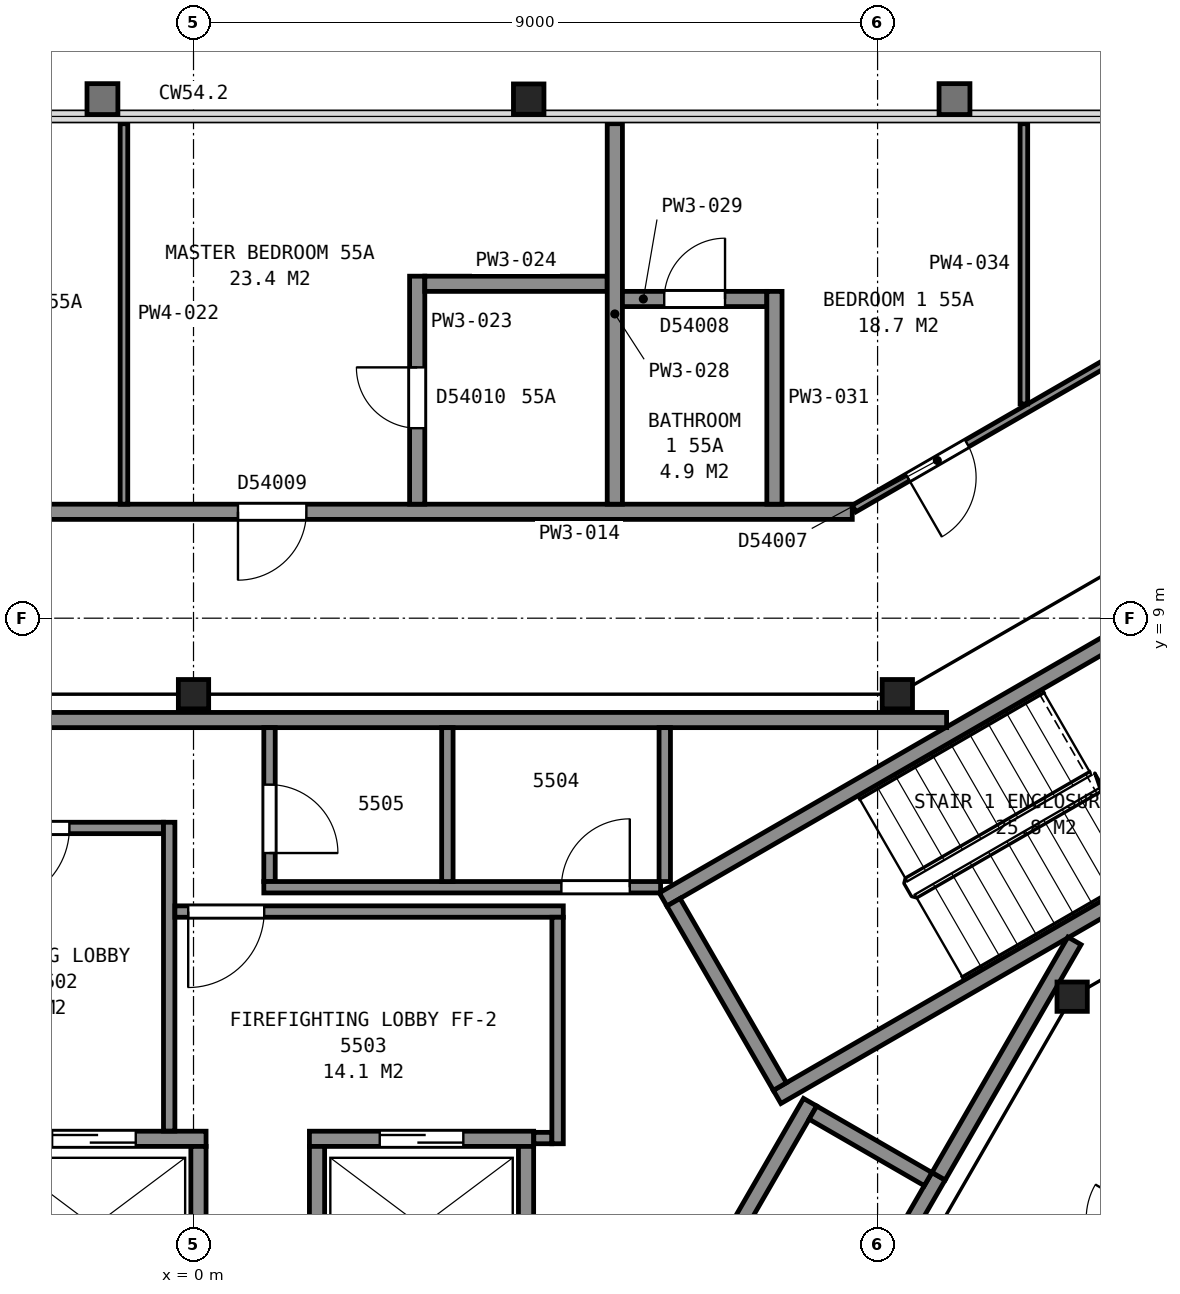
"""IFC4 building model, lengths in metres.
Left out: names, types, materials, properties, quantities, classifications, styles, units other than length and angle.
Written with IfcOpenShell. Run it as: python <this file> out.ifc"""

import sys

from ifc_helpers import new_model, si_unit, direction, frame, frame_2d, origin, origin_2d, place, context, subcontext, project, spatial, rectangle, i_section, extrude, element, fill, save


model = new_model("IFC4")
c1 = context("Model", 3, precision=1e-05, world=origin(), true_north=direction((0.0, 1.0)))
c2 = subcontext(c1, "Body", "Model", "MODEL_VIEW")
j1 = project(units=[si_unit("LENGTHUNIT", "METRE"), si_unit("PLANEANGLEUNIT", "RADIAN")], contexts=[c1])
p1 = place(None, origin())
s1 = spatial("IfcSite", under=j1, at=p1, CompositionType="ELEMENT")
p2 = place(p1, origin())
s2 = spatial("IfcBuilding", under=s1, at=p2, CompositionType="ELEMENT")
p3 = place(p2, frame((0.0, 0.0, 221.2)))
s3 = spatial("IfcBuildingStorey", under=s2, at=p3, CompositionType="ELEMENT", Elevation=221.2)
p4 = place(p3, frame((4.41, 15.83, 0.0), z_axis=(0.0, 0.0, 1.0), x_axis=(1.0, 0.0, 0.0)))
e1 = element("IfcColumn", 1, at=p4, inside=s3, PredefinedType="COLUMN", context=c2, shape_type="SweptSolid", body=[
    extrude(i_section(OverallWidth=0.401, OverallDepth=0.399, WebThickness=0.025, FlangeThickness=0.04, FilletRadius=0.015, at=origin_2d()), origin(), (0.0, 0.0, 1.0), 3.7),
])
for number, where, z_axis, x_axis in (
    (2, (11.56, 4.02, 0.0), (0.0, 0.0, 1.0), (1.0, 0.0, 0.0)),
    (3, (9.26, 8.0, 0.0), (0.0, 0.0, 1.0), (1.0, 0.0, 0.0)),
    (4, (0.0, 8.0, 0.0), (0.0, 0.0, 1.0), (1.0, 0.0, 0.0)),
):
    element("IfcColumn", number, at=place(p3, frame(where, z_axis=z_axis, x_axis=x_axis)), inside=s3, PredefinedType="COLUMN", context=c2, shape_type="SweptSolid", body=[
        extrude(i_section(OverallWidth=0.399, OverallDepth=0.386, WebThickness=0.021, FlangeThickness=0.033, FilletRadius=0.015, at=origin_2d()), origin(), (0.0, 0.0, 1.0), 3.7),
    ])
for number, where, z_axis, x_axis in (
    (5, (6.178, 5.299, 0.0), (0.0, 0.0, 1.0), (0.866, 0.5, 0.0)),
    (6, (7.678, 2.701, 0.0), (0.0, 0.0, 1.0), (0.866, 0.5, 0.0)),
):
    element("IfcWall", number, at=place(p3, frame(where, z_axis=z_axis, x_axis=x_axis)), inside=s3, PredefinedType="PARTITIONING", context=c2, shape_type="SweptSolid", body=[
        extrude(rectangle(XDim=9.6, YDim=0.2, at=frame_2d((4.8, 0.0))), origin(), (0.0, 0.0, 1.0), 3.45),
    ])
p5 = place(p3, frame((7.715, 2.838, 0.0), z_axis=(0.0, 0.0, 1.0), x_axis=(-0.500049511043, 0.865996816683, 0.0)))
e7 = element("IfcWall", 7, at=p5, inside=s3, PredefinedType="PARTITIONING", context=c2, shape_type="SweptSolid", body=[
    extrude(rectangle(XDim=2.8, YDim=0.2, at=frame_2d((1.4, 0.0))), origin(), (0.0, 0.0, 1.0), 3.45),
])
p6 = place(p3, frame((-2.785, 2.15, 0.0), z_axis=(0.0, 0.0, 1.0), x_axis=(1.0, 0.0, 0.0)))
e8 = element("IfcWall", 8, at=p6, inside=s3, PredefinedType="PARTITIONING", context=c2, shape_type="SweptSolid", body=[
    extrude(rectangle(XDim=2.95, YDim=0.2, at=frame_2d((1.475, 0.0))), origin(), (0.0, 0.0, 1.0), 3.7),
])
p7 = place(p6, frame((0.925, 0.0, 0.0)))
e9 = element("IfcOpeningElement", 9, at=p7, cuts=e8, PredefinedType="OPENING", context=c2, shape_type="SweptSolid", body=[
    extrude(rectangle(XDim=1.1, YDim=2.1, at=frame_2d((0.55, 1.05))), frame((0.0, 0.11, 0.0), z_axis=(0.0, -1.0, 0.0), x_axis=(1.0, 0.0, 0.0)), (0.0, 0.0, 1.0), 0.22),
])
p8 = place(p3, frame((1.525, 2.15, 0.0), z_axis=(0.0, 0.0, 1.0), x_axis=(1.0, 0.0, 0.0)))
e10 = element("IfcWall", 10, at=p8, inside=s3, PredefinedType="PARTITIONING", context=c2, shape_type="SweptSolid", body=[
    extrude(rectangle(XDim=2.95, YDim=0.2, at=frame_2d((1.475, 0.0))), origin(), (0.0, 0.0, 1.0), 3.7),
])
p9 = place(p8, frame((0.925, 0.0, 0.0)))
e11 = element("IfcOpeningElement", 11, at=p9, cuts=e10, PredefinedType="OPENING", context=c2, shape_type="SweptSolid", body=[
    extrude(rectangle(XDim=1.1, YDim=2.1, at=frame_2d((0.55, 1.05))), frame((0.0, 0.11, 0.0), z_axis=(0.0, -1.0, 0.0), x_axis=(1.0, 0.0, 0.0)), (0.0, 0.0, 1.0), 0.22),
])
p10 = place(p3, frame((7.351, -2.587, 0.0), z_axis=(0.0, 0.0, 1.0), x_axis=(0.500002801628, 0.866023786258, 0.0)))
e12 = element("IfcWall", 12, at=p10, inside=s3, PredefinedType="PARTITIONING", context=c2, shape_type="SweptSolid", body=[
    extrude(rectangle(XDim=4.9, YDim=0.2, at=frame_2d((2.45, 0.0))), origin(), (0.0, 0.0, 1.0), 3.7),
])
p11 = place(p3, frame((5.663, -1.612, 0.0), z_axis=(0.0, 0.0, 1.0), x_axis=(0.49998122708, 0.866036242063, 0.0)))
e13 = element("IfcWall", 13, at=p11, inside=s3, PredefinedType="PARTITIONING", context=c2, shape_type="SweptSolid", body=[
    extrude(rectangle(XDim=4.9, YDim=0.2, at=frame_2d((2.45, 0.0))), origin(), (0.0, 0.0, 1.0), 3.7),
])
for number, where, z_axis, x_axis in (
    (14, (4.375, 0.1, 0.0), (0.0, 0.0, 1.0), (0.0, 1.0, 0.0)),
    (15, (1.625, 0.1, 0.0), (0.0, 0.0, 1.0), (0.0, 1.0, 0.0)),
    (16, (0.065, 0.1, 0.0), (0.0, 0.0, 1.0), (0.0, 1.0, 0.0)),
):
    element("IfcWall", number, at=place(p3, frame(where, z_axis=z_axis, x_axis=x_axis)), inside=s3, PredefinedType="PARTITIONING", context=c2, shape_type="SweptSolid", body=[
        extrude(rectangle(XDim=1.95, YDim=0.2, at=frame_2d((0.975, 0.0))), origin(), (0.0, 0.0, 1.0), 3.7),
    ])
p12 = place(p3, frame((9.665, 1.62, 0.0), z_axis=(0.0, 0.0, 1.0), x_axis=(-0.866002029911, 0.500040482552, 0.0)))
e17 = element("IfcWall", 17, at=p12, inside=s3, PredefinedType="PARTITIONING", context=c2, shape_type="SweptSolid", body=[
    extrude(rectangle(XDim=1.75, YDim=0.2, at=frame_2d((0.875, 0.0))), origin(), (0.0, 0.0, 1.0), 3.7),
])
p13 = place(p3, frame((-3.933, 6.24, 0.0), z_axis=(0.0, 0.0, 1.0), x_axis=(1.0, 0.0, 0.0)))
e18 = element("IfcWall", 18, at=p13, inside=s3, PredefinedType="PARTITIONING", context=c2, shape_type="SweptSolid", body=[
    extrude(rectangle(XDim=3.538, YDim=0.15, at=frame_2d((1.769, 0.0))), origin(), (0.0, 0.0, 1.0), 3.45),
])
p14 = place(p13, frame((1.3, 0.0, 0.0)))
e19 = element("IfcOpeningElement", 19, at=p14, cuts=e18, PredefinedType="OPENING", context=c2, shape_type="SweptSolid", body=[
    extrude(rectangle(XDim=1.0, YDim=2.1, at=frame_2d((0.5, 1.05))), frame((0.0, 0.085, 0.0), z_axis=(0.0, -1.0, 0.0), x_axis=(1.0, 0.0, 0.0)), (0.0, 0.0, 1.0), 0.17),
])
p15 = place(p3, frame((-3.933, 7.66, 0.0), z_axis=(0.0, 0.0, 1.0), x_axis=(1.0, 0.0, 0.0)))
e20 = element("IfcWall", 20, at=p15, inside=s3, PredefinedType="PARTITIONING", context=c2, shape_type="SweptSolid", body=[
    extrude(rectangle(XDim=13.841, YDim=0.2, at=frame_2d((6.92, 0.0))), origin(), (0.0, 0.0, 1.0), 3.45),
])
p16 = place(p3, frame((-0.32, 2.252, 0.0), z_axis=(0.0, 0.0, 1.0), x_axis=(0.0, 1.0, 0.0)))
e21 = element("IfcWall", 21, at=p16, inside=s3, PredefinedType="PARTITIONING", context=c2, shape_type="SweptSolid", body=[
    extrude(rectangle(XDim=4.063, YDim=0.15, at=frame_2d((2.031, 0.0))), origin(), (0.0, 0.0, 1.0), 3.45),
])
p17 = place(p3, frame((-0.245, 5.14, 0.0), z_axis=(0.0, 0.0, 1.0), x_axis=(1.0, 0.0, 0.0)))
e22 = element("IfcWall", 22, at=p17, inside=s3, PredefinedType="PARTITIONING", context=c2, shape_type="SweptSolid", body=[
    extrude(rectangle(XDim=5.11, YDim=0.15, at=frame_2d((2.555, 0.0))), origin(), (0.0, 0.0, 1.0), 3.45),
])
p18 = place(p17, frame((0.175, 0.0, 0.0)))
e23 = element("IfcOpeningElement", 23, at=p18, cuts=e22, PredefinedType="OPENING", context=c2, shape_type="SweptSolid", body=[
    extrude(rectangle(XDim=1.0, YDim=2.1, at=frame_2d((0.5, 1.05))), frame((0.0, 0.085, 0.0), z_axis=(0.0, -1.0, 0.0), x_axis=(1.0, 0.0, 0.0)), (0.0, 0.0, 1.0), 0.17),
])
p19 = place(p3, frame((1.0, 7.56, 0.0), z_axis=(0.0, 0.0, 1.0), x_axis=(0.0, -1.0, 0.0)))
e24 = element("IfcWall", 24, at=p19, inside=s3, PredefinedType="PARTITIONING", context=c2, shape_type="SweptSolid", body=[
    extrude(rectangle(XDim=2.025, YDim=0.15, at=frame_2d((1.013, 0.0))), origin(), (0.0, 0.0, 1.0), 3.45),
])
p20 = place(p19, frame((0.75, 0.0, 0.0)))
e25 = element("IfcOpeningElement", 25, at=p20, cuts=e24, PredefinedType="OPENING", context=c2, shape_type="SweptSolid", body=[
    extrude(rectangle(XDim=0.9, YDim=2.1, at=frame_2d((0.45, 1.05))), frame((0.0, 0.085, 0.0), z_axis=(0.0, -1.0, 0.0), x_axis=(1.0, 0.0, 0.0)), (0.0, 0.0, 1.0), 0.17),
])
p21 = place(p3, frame((0.925, 5.46, 0.0), z_axis=(0.0, 0.0, 1.0), x_axis=(1.0, 0.0, 0.0)))
e26 = element("IfcWall", 26, at=p21, inside=s3, PredefinedType="PARTITIONING", context=c2, shape_type="SweptSolid", body=[
    extrude(rectangle(XDim=5.22, YDim=0.15, at=frame_2d((2.61, 0.0))), origin(), (0.0, 0.0, 1.0), 3.45),
])
p22 = place(p21, frame((3.915, 0.0, 0.0)))
e27 = element("IfcOpeningElement", 27, at=p22, cuts=e26, PredefinedType="OPENING", context=c2, shape_type="SweptSolid", body=[
    extrude(rectangle(XDim=0.9, YDim=2.1, at=frame_2d((0.45, 1.05))), frame((0.0, 0.085, 0.0), z_axis=(0.0, -1.0, 0.0), x_axis=(1.0, 0.0, 0.0)), (0.0, 0.0, 1.0), 0.17),
])
p23 = place(p3, frame((3.34, 5.535, 0.0), z_axis=(0.0, 0.0, 1.0), x_axis=(0.0, 1.0, 0.0)))
e28 = element("IfcWall", 28, at=p23, inside=s3, PredefinedType="PARTITIONING", context=c2, shape_type="SweptSolid", body=[
    extrude(rectangle(XDim=2.025, YDim=0.15, at=frame_2d((1.013, 0.0))), origin(), (0.0, 0.0, 1.0), 3.45),
])
p24 = place(p3, frame((4.477, 2.16, 0.0), z_axis=(0.0, 0.0, 1.0), x_axis=(1.0, 0.0, 0.0)))
e29 = element("IfcWall", 29, at=p24, inside=s3, PredefinedType="PARTITIONING", context=c2, shape_type="SweptSolid", body=[
    extrude(rectangle(XDim=0.238, YDim=0.15, at=frame_2d((0.119, 0.0))), origin(), (0.0, 0.0, 1.0), 3.45),
])
p25 = place(p3, frame((4.79, 2.085, 0.0), z_axis=(0.0, 0.0, 1.0), x_axis=(0.0, 1.0, 0.0)))
e30 = element("IfcWall", 30, at=p25, inside=s3, PredefinedType="PARTITIONING", context=c2, shape_type="SweptSolid", body=[
    extrude(rectangle(XDim=2.98, YDim=0.15, at=frame_2d((1.49, 0.0))), origin(), (0.0, 0.0, 1.0), 3.45),
])
p26 = place(p3, frame((6.2, 5.535, 0.0), z_axis=(0.0, 0.0, 1.0), x_axis=(0.0, 1.0, 0.0)))
e31 = element("IfcWall", 31, at=p26, inside=s3, PredefinedType="PARTITIONING", context=c2, shape_type="SweptSolid", body=[
    extrude(rectangle(XDim=2.025, YDim=0.15, at=frame_2d((1.013, 0.0))), origin(), (0.0, 0.0, 1.0), 3.45),
])
p27 = place(p3, frame((9.803, 1.658, 0.0), z_axis=(0.0, 0.0, 1.0), x_axis=(0.499943114462, 0.866058244174, 0.0)))
e32 = element("IfcWall", 32, at=p27, inside=s3, PredefinedType="PARTITIONING", context=c2, shape_type="SweptSolid", body=[
    extrude(rectangle(XDim=3.576, YDim=0.2, at=frame_2d((1.788, 0.0))), origin(), (0.0, 0.0, 1.0), 3.45),
])
p28 = place(p3, frame((-8.667, 10.4, 0.0), z_axis=(0.0, 0.0, 1.0), x_axis=(1.0, 0.0, 0.0)))
e33 = element("IfcWall", 33, at=p28, inside=s3, PredefinedType="PARTITIONING", context=c2, shape_type="SweptSolid", body=[
    extrude(rectangle(XDim=17.334, YDim=0.2, at=frame_2d((8.667, 0.0))), origin(), (0.0, 0.0, 1.0), 2.713),
])
p29 = place(p28, frame((9.252, 0.0, 0.0)))
e34 = element("IfcOpeningElement", 34, at=p29, cuts=e33, PredefinedType="OPENING", context=c2, shape_type="SweptSolid", body=[
    extrude(rectangle(XDim=0.9, YDim=2.1, at=frame_2d((0.45, 1.05))), frame((0.0, 0.11, 0.0), z_axis=(0.0, -1.0, 0.0), x_axis=(1.0, 0.0, 0.0)), (0.0, 0.0, 1.0), 0.22),
])
p30 = place(p28, frame((4.851, 0.0, 0.0)))
e35 = element("IfcOpeningElement", 35, at=p30, cuts=e33, PredefinedType="OPENING", context=c2, shape_type="SweptSolid", body=[
    extrude(rectangle(XDim=0.9, YDim=2.1, at=frame_2d((0.45, 1.05))), frame((0.0, 0.11, 0.0), z_axis=(0.0, -1.0, 0.0), x_axis=(1.0, 0.0, 0.0)), (0.0, 0.0, 1.0), 0.22),
])
p31 = place(p3, frame((-0.915, 10.5, 0.0), z_axis=(0.0, 0.0, 1.0), x_axis=(0.0, 1.0, 0.0)))
e36 = element("IfcWall", 36, at=p31, inside=s3, PredefinedType="PARTITIONING", context=c2, shape_type="SweptSolid", body=[
    extrude(rectangle(XDim=5.006, YDim=0.1, at=frame_2d((2.503, 0.0))), origin(), (0.0, 0.0, 1.0), 2.713),
])
p32 = place(p3, frame((2.943, 13.5, 0.0), z_axis=(0.0, 0.0, 1.0), x_axis=(0.0, -1.0, 0.0)))
e37 = element("IfcWall", 37, at=p32, inside=s3, PredefinedType="PARTITIONING", context=c2, shape_type="SweptSolid", body=[
    extrude(rectangle(XDim=3.0, YDim=0.2, at=frame_2d((1.5, 0.0))), origin(), (0.0, 0.0, 1.0), 2.713),
])
p33 = place(p32, frame((1.2, 0.0, 0.0)))
e38 = element("IfcOpeningElement", 38, at=p33, cuts=e37, PredefinedType="OPENING", context=c2, shape_type="SweptSolid", body=[
    extrude(rectangle(XDim=0.8, YDim=2.1, at=frame_2d((0.4, 1.05))), frame((0.0, 0.11, 0.0), z_axis=(0.0, -1.0, 0.0), x_axis=(1.0, 0.0, 0.0)), (0.0, 0.0, 1.0), 0.22),
])
p34 = place(p3, frame((3.043, 13.4, 0.0), z_axis=(0.0, 0.0, 1.0), x_axis=(1.0, 0.0, 0.0)))
e39 = element("IfcWall", 39, at=p34, inside=s3, PredefinedType="PARTITIONING", context=c2, shape_type="SweptSolid", body=[
    extrude(rectangle(XDim=2.4, YDim=0.2, at=frame_2d((1.2, 0.0))), origin(), (0.0, 0.0, 1.0), 2.713),
])
p35 = place(p3, frame((13.342, 2.306, 0.0), z_axis=(0.0, 0.0, 1.0), x_axis=(-0.49997440863, -0.866040178465, 0.0)))
e40 = element("IfcWall", 40, at=p35, inside=s3, PredefinedType="PARTITIONING", context=c2, shape_type="SweptSolid", body=[
    extrude(rectangle(XDim=17.335, YDim=0.1, at=frame_2d((8.667, 0.0))), origin(), (0.0, 0.0, 1.0), 2.713),
])
p36 = place(p35, frame((14.935, 0.0, 0.0)))
e41 = element("IfcOpeningElement", 41, at=p36, cuts=e40, PredefinedType="OPENING", context=c2, shape_type="SweptSolid", body=[
    extrude(rectangle(XDim=0.9, YDim=2.1, at=frame_2d((0.45, 1.05))), frame((0.0, 0.06, 0.0), z_axis=(0.0, -1.0, 0.0), x_axis=(1.0, 0.0, 0.0)), (0.0, 0.0, 1.0), 0.12),
])
p37 = place(p35, frame((10.794, 0.0, 0.0)))
e42 = element("IfcOpeningElement", 42, at=p37, cuts=e40, PredefinedType="OPENING", context=c2, shape_type="SweptSolid", body=[
    extrude(rectangle(XDim=0.9, YDim=2.1, at=frame_2d((0.45, 1.05))), frame((0.0, 0.06, 0.0), z_axis=(0.0, -1.0, 0.0), x_axis=(1.0, 0.0, 0.0)), (0.0, 0.0, 1.0), 0.12),
])
p38 = place(p35, frame((5.866, 0.0, 0.0)))
e43 = element("IfcOpeningElement", 43, at=p38, cuts=e40, PredefinedType="OPENING", context=c2, shape_type="SweptSolid", body=[
    extrude(rectangle(XDim=0.9, YDim=2.1, at=frame_2d((0.45, 1.05))), frame((0.0, 0.06, 0.0), z_axis=(0.0, -1.0, 0.0), x_axis=(1.0, 0.0, 0.0)), (0.0, 0.0, 1.0), 0.12),
])
p39 = place(p35, frame((1.395, 0.0, 0.0)))
e44 = element("IfcOpeningElement", 44, at=p39, cuts=e40, PredefinedType="OPENING", context=c2, shape_type="SweptSolid", body=[
    extrude(rectangle(XDim=0.9, YDim=2.1, at=frame_2d((0.45, 1.05))), frame((0.0, 0.06, 0.0), z_axis=(0.0, -1.0, 0.0), x_axis=(1.0, 0.0, 0.0)), (0.0, 0.0, 1.0), 0.12),
])
p40 = place(p3, frame((5.543, 10.5, 0.0), z_axis=(0.0, 0.0, 1.0), x_axis=(0.0, 1.0, 0.0)))
e45 = element("IfcWall", 45, at=p40, inside=s3, PredefinedType="PARTITIONING", context=c2, shape_type="SweptSolid", body=[
    extrude(rectangle(XDim=5.006, YDim=0.2, at=frame_2d((2.503, 0.0))), origin(), (0.0, 0.0, 1.0), 2.713),
])
p41 = place(p3, frame((7.543, 13.2, 0.0), z_axis=(0.0, 0.0, 1.0), x_axis=(-1.0, 0.0, 0.0)))
e46 = element("IfcWall", 46, at=p41, inside=s3, PredefinedType="PARTITIONING", context=c2, shape_type="SweptSolid", body=[
    extrude(rectangle(XDim=1.9, YDim=0.2, at=frame_2d((0.95, 0.0))), origin(), (0.0, 0.0, 1.0), 2.713),
])
p42 = place(p41, frame((0.55, 0.0, 0.0)))
e47 = element("IfcOpeningElement", 47, at=p42, cuts=e46, PredefinedType="OPENING", context=c2, shape_type="SweptSolid", body=[
    extrude(rectangle(XDim=0.8, YDim=2.1, at=frame_2d((0.4, 1.05))), frame((0.0, 0.11, 0.0), z_axis=(0.0, -1.0, 0.0), x_axis=(1.0, 0.0, 0.0)), (0.0, 0.0, 1.0), 0.22),
])
p43 = place(p3, frame((7.643, 10.5, 0.0), z_axis=(0.0, 0.0, 1.0), x_axis=(0.0, 1.0, 0.0)))
e48 = element("IfcWall", 48, at=p43, inside=s3, PredefinedType="PARTITIONING", context=c2, shape_type="SweptSolid", body=[
    extrude(rectangle(XDim=2.8, YDim=0.2, at=frame_2d((1.4, 0.0))), origin(), (0.0, 0.0, 1.0), 2.713),
])
p44 = place(p3, frame((8.691, 10.442, 0.0), z_axis=(0.0, 0.0, 1.0), x_axis=(0.866070360466, 0.499922124658, 0.0)))
e49 = element("IfcWall", 49, at=p44, inside=s3, PredefinedType="PARTITIONING", context=c2, shape_type="SweptSolid", body=[
    extrude(rectangle(XDim=8.503, YDim=0.1, at=frame_2d((4.251, 0.0))), origin(), (0.0, 0.0, 1.0), 2.713),
])
p45 = place(p44, frame((0.815, 0.0, 0.0)))
e50 = element("IfcOpeningElement", 50, at=p45, cuts=e49, PredefinedType="OPENING", context=c2, shape_type="SweptSolid", body=[
    extrude(rectangle(XDim=0.9, YDim=2.1, at=frame_2d((0.45, 1.05))), frame((0.0, 0.06, 0.0), z_axis=(0.0, -1.0, 0.0), x_axis=(1.0, 0.0, 0.0)), (0.0, 0.0, 1.0), 0.12),
])
p46 = place(p3, frame((10.925, 11.819, 0.0), z_axis=(0.0, 0.0, 1.0), x_axis=(0.0, 1.0, 0.0)))
e51 = element("IfcWall", 51, at=p46, inside=s3, PredefinedType="PARTITIONING", context=c2, shape_type="SweptSolid", body=[
    extrude(rectangle(XDim=3.688, YDim=0.1, at=frame_2d((1.844, 0.0))), origin(), (0.0, 0.0, 1.0), 2.713),
])
p47 = place(p7, origin())
e52 = element("IfcDoor", 52, at=p47, inside=s3, OperationType="SLIDING_TO_LEFT", PredefinedType="DOOR", context=c2, shape_type="SweptSolid", body=[
    extrude(rectangle(XDim=1.1, YDim=2.1, at=frame_2d((0.55, 1.05))), frame((0.0, 0.025, 0.0), z_axis=(0.0, -1.0, 0.0), x_axis=(1.0, 0.0, 0.0)), (0.0, 0.0, 1.0), 0.05),
])
fill(e9, e52)
p48 = place(p9, origin())
e53 = element("IfcDoor", 53, at=p48, inside=s3, OperationType="SLIDING_TO_RIGHT", PredefinedType="DOOR", context=c2, shape_type="SweptSolid", body=[
    extrude(rectangle(XDim=1.1, YDim=2.1, at=frame_2d((0.55, 1.05))), frame((0.0, 0.025, 0.0), z_axis=(0.0, -1.0, 0.0), x_axis=(1.0, 0.0, 0.0)), (0.0, 0.0, 1.0), 0.05),
])
fill(e11, e53)
p49 = place(p14, origin())
e54 = element("IfcDoor", 54, at=p49, inside=s3, OperationType="SINGLE_SWING_LEFT", PredefinedType="DOOR", context=c2, shape_type="SweptSolid", body=[
    extrude(rectangle(XDim=1.0, YDim=2.1, at=frame_2d((0.5, 1.05))), frame((0.0, 0.025, 0.0), z_axis=(0.0, -1.0, 0.0), x_axis=(1.0, 0.0, 0.0)), (0.0, 0.0, 1.0), 0.05),
])
fill(e19, e54)
p50 = place(p18, origin())
e55 = element("IfcDoor", 55, at=p50, inside=s3, OperationType="SINGLE_SWING_LEFT", PredefinedType="DOOR", context=c2, shape_type="SweptSolid", body=[
    extrude(rectangle(XDim=1.0, YDim=2.1, at=frame_2d((0.5, 1.05))), frame((0.0, 0.025, 0.0), z_axis=(0.0, -1.0, 0.0), x_axis=(1.0, 0.0, 0.0)), (0.0, 0.0, 1.0), 0.05),
])
fill(e23, e55)
p51 = place(p20, origin())
e56 = element("IfcDoor", 56, at=p51, inside=s3, OperationType="SINGLE_SWING_RIGHT", PredefinedType="DOOR", context=c2, shape_type="SweptSolid", body=[
    extrude(rectangle(XDim=0.9, YDim=2.1, at=frame_2d((0.45, 1.05))), frame((0.0, 0.025, 0.0), z_axis=(0.0, -1.0, 0.0), x_axis=(1.0, 0.0, 0.0)), (0.0, 0.0, 1.0), 0.05),
])
fill(e25, e56)
p52 = place(p22, origin())
e57 = element("IfcDoor", 57, at=p52, inside=s3, OperationType="SINGLE_SWING_RIGHT", PredefinedType="DOOR", context=c2, shape_type="SweptSolid", body=[
    extrude(rectangle(XDim=0.9, YDim=2.1, at=frame_2d((0.45, 1.05))), frame((0.0, 0.025, 0.0), z_axis=(0.0, -1.0, 0.0), x_axis=(1.0, 0.0, 0.0)), (0.0, 0.0, 1.0), 0.05),
])
fill(e27, e57)
p53 = place(p29, origin())
e58 = element("IfcDoor", 58, at=p53, inside=s3, OperationType="SINGLE_SWING_LEFT", PredefinedType="DOOR", context=c2, shape_type="SweptSolid", body=[
    extrude(rectangle(XDim=0.9, YDim=2.1, at=frame_2d((0.45, 1.05))), frame((0.0, 0.025, 0.0), z_axis=(0.0, -1.0, 0.0), x_axis=(1.0, 0.0, 0.0)), (0.0, 0.0, 1.0), 0.05),
])
fill(e34, e58)
p54 = place(p33, origin())
e59 = element("IfcDoor", 59, at=p54, inside=s3, OperationType="SINGLE_SWING_LEFT", PredefinedType="DOOR", context=c2, shape_type="SweptSolid", body=[
    extrude(rectangle(XDim=0.8, YDim=2.1, at=frame_2d((0.4, 1.05))), frame((0.0, 0.025, 0.0), z_axis=(0.0, -1.0, 0.0), x_axis=(1.0, 0.0, 0.0)), (0.0, 0.0, 1.0), 0.05),
])
fill(e38, e59)
p55 = place(p42, origin())
e60 = element("IfcDoor", 60, at=p55, inside=s3, OperationType="SINGLE_SWING_LEFT", PredefinedType="DOOR", context=c2, shape_type="SweptSolid", body=[
    extrude(rectangle(XDim=0.8, YDim=2.1, at=frame_2d((0.4, 1.05))), frame((0.0, 0.025, 0.0), z_axis=(0.0, -1.0, 0.0), x_axis=(1.0, 0.0, 0.0)), (0.0, 0.0, 1.0), 0.05),
])
fill(e47, e60)
p56 = place(p45, origin())
e61 = element("IfcDoor", 61, at=p56, inside=s3, OperationType="SINGLE_SWING_LEFT", PredefinedType="DOOR", context=c2, shape_type="SweptSolid", body=[
    extrude(rectangle(XDim=0.9, YDim=2.1, at=frame_2d((0.45, 1.05))), frame((0.0, 0.025, 0.0), z_axis=(0.0, -1.0, 0.0), x_axis=(1.0, 0.0, 0.0)), (0.0, 0.0, 1.0), 0.05),
])
fill(e50, e61)
save(model, sys.argv[1])
